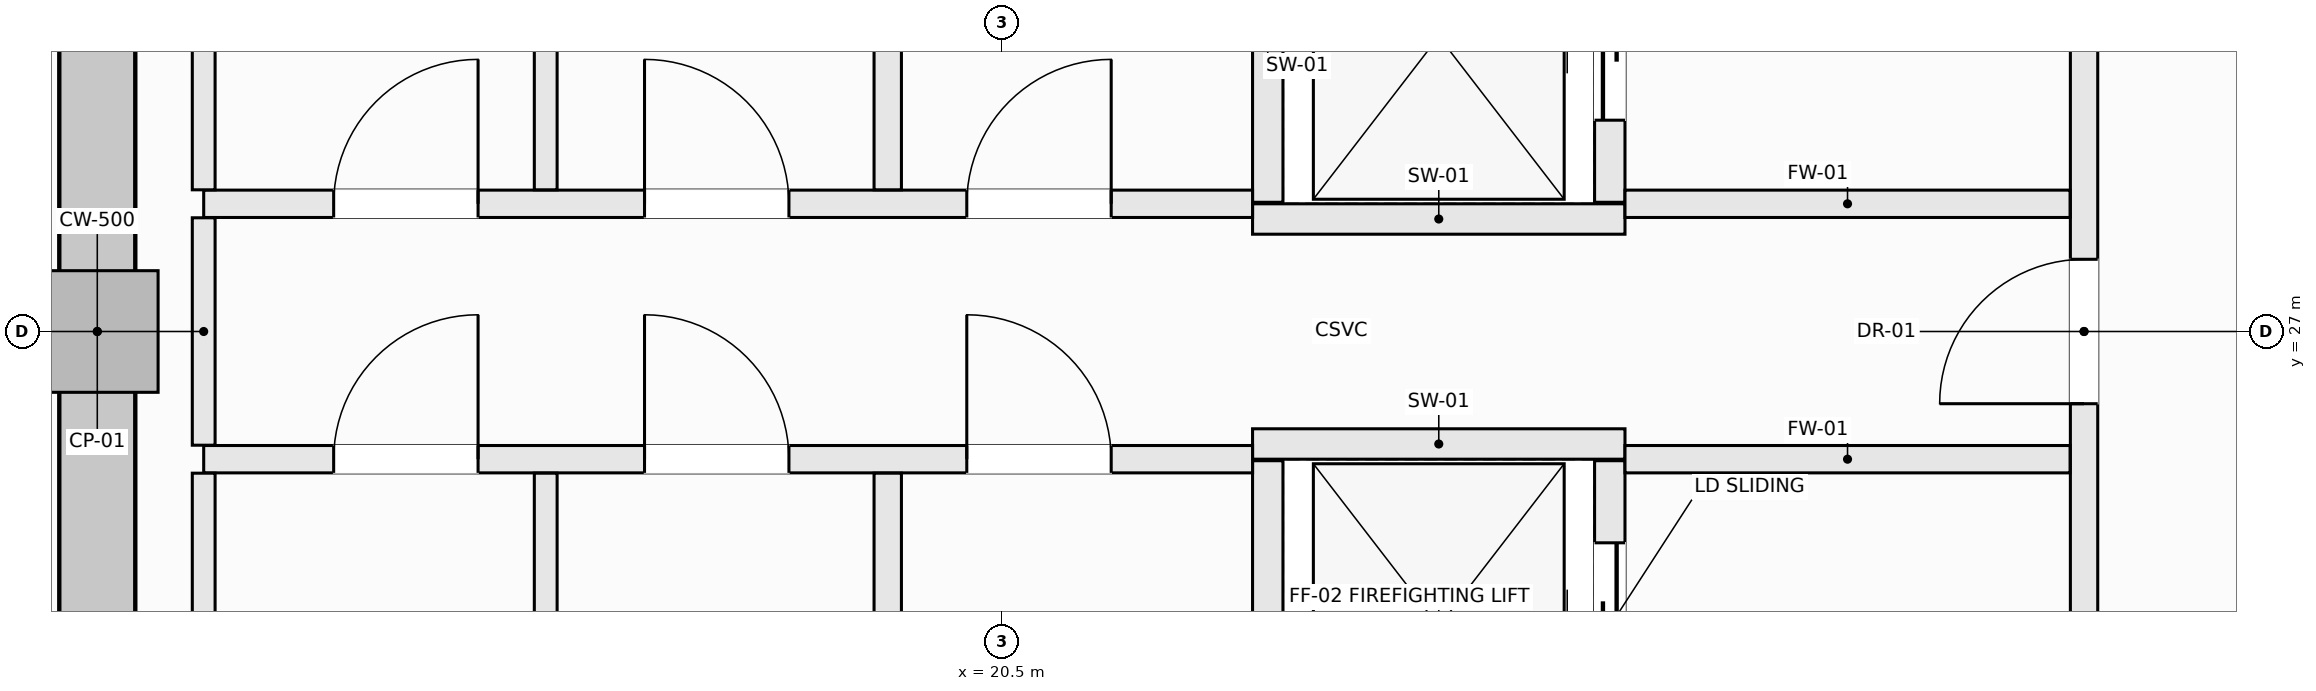
"""IFC4 building model, lengths in metres.
Left out: names, types, materials, properties, quantities, classifications, styles, units other than length and angle.
Written with IfcOpenShell. Run it as: python <this file> out.ifc"""

import sys

from ifc_helpers import new_model, si_unit, direction, frame, frame_2d, origin, origin_2d, place, context, subcontext, project, spatial, rectangle, extrude, element, fill, save


model = new_model("IFC4")
c1 = context("Model", 3, precision=1e-05, world=origin(), true_north=direction((0.0, 1.0)))
c2 = subcontext(c1, "Body", "Model", "MODEL_VIEW")
j1 = project(units=[si_unit("LENGTHUNIT", "METRE"), si_unit("PLANEANGLEUNIT", "RADIAN")], contexts=[c1])
p1 = place(None, origin())
s1 = spatial("IfcSite", under=j1, at=p1, CompositionType="ELEMENT")
p2 = place(p1, origin())
s2 = spatial("IfcBuilding", under=s1, at=p2, CompositionType="ELEMENT")
p3 = place(p2, frame((0.0, 0.0, 191.9)))
s3 = spatial("IfcBuildingStorey", under=s2, at=p3, CompositionType="ELEMENT", Elevation=191.9)
p4 = place(p3, frame((14.55, 20.55, -0.28), z_axis=(0.0, 0.0, 1.0), x_axis=(0.0, 1.0, 0.0)))
e1 = element("IfcWall", 1, at=p4, inside=s3, PredefinedType="SHEAR", context=c2, shape_type="SweptSolid", body=[
    extrude(rectangle(XDim=12.9, YDim=0.5, at=frame_2d((6.45, 0.0))), origin(), (0.0, 0.0, 1.0), 4.51),
])
p5 = place(p3, frame((14.55, 27.0, -0.28), z_axis=(0.0, 0.0, 1.0), x_axis=(1.0, 0.0, 0.0)))
e2 = element("IfcColumn", 2, at=p5, inside=s3, PredefinedType="PILASTER", context=c2, shape_type="SweptSolid", body=[
    extrude(rectangle(XDim=0.8, YDim=0.8, at=origin_2d()), origin(), (0.0, 0.0, 1.0), 4.51),
])
p6 = place(p3, frame((22.15, 27.74, 0.0), z_axis=(0.0, 0.0, 1.0), x_axis=(1.0, 0.0, 0.0)))
e3 = element("IfcWall", 3, at=p6, inside=s3, PredefinedType="SOLIDWALL", context=c2, shape_type="SweptSolid", body=[
    extrude(rectangle(XDim=2.45, YDim=0.2, at=frame_2d((1.225, 0.0))), origin(), (0.0, 0.0, 1.0), 4.23),
])
p7 = place(p3, frame((22.25, 27.85, 0.0), z_axis=(0.0, 0.0, 1.0), x_axis=(0.0, 1.0, 0.0)))
e4 = element("IfcWall", 4, at=p7, inside=s3, PredefinedType="SOLIDWALL", context=c2, shape_type="SweptSolid", body=[
    extrude(rectangle(XDim=2.18, YDim=0.2, at=frame_2d((1.09, 0.0))), origin(), (0.0, 0.0, 1.0), 4.23),
])
p8 = place(p3, frame((24.5, 27.85, 0.0), z_axis=(0.0, 0.0, 1.0), x_axis=(0.0, 1.0, 0.0)))
e5 = element("IfcWall", 5, at=p8, inside=s3, PredefinedType="SOLIDWALL", context=c2, shape_type="SweptSolid", body=[
    extrude(rectangle(XDim=2.18, YDim=0.2, at=frame_2d((1.09, 0.0))), origin(), (0.0, 0.0, 1.0), 4.23),
])
p9 = place(p8, frame((0.54, 0.0, 0.0)))
e6 = element("IfcOpeningElement", 6, at=p9, cuts=e5, PredefinedType="OPENING", context=c2, shape_type="SweptSolid", body=[
    extrude(rectangle(XDim=1.1, YDim=2.2, at=frame_2d((0.55, 1.1))), frame((0.0, 0.11, 0.0), z_axis=(0.0, -1.0, 0.0), x_axis=(1.0, 0.0, 0.0)), (0.0, 0.0, 1.0), 0.22),
])
p10 = place(p3, frame((22.15, 26.26, 0.0), z_axis=(0.0, 0.0, 1.0), x_axis=(1.0, 0.0, 0.0)))
e7 = element("IfcWall", 7, at=p10, inside=s3, PredefinedType="SOLIDWALL", context=c2, shape_type="SweptSolid", body=[
    extrude(rectangle(XDim=2.45, YDim=0.2, at=frame_2d((1.225, 0.0))), origin(), (0.0, 0.0, 1.0), 4.23),
])
p11 = place(p3, frame((22.25, 23.97, 0.0), z_axis=(0.0, 0.0, 1.0), x_axis=(0.0, 1.0, 0.0)))
e8 = element("IfcWall", 8, at=p11, inside=s3, PredefinedType="SOLIDWALL", context=c2, shape_type="SweptSolid", body=[
    extrude(rectangle(XDim=2.18, YDim=0.2, at=frame_2d((1.09, 0.0))), origin(), (0.0, 0.0, 1.0), 4.23),
])
p12 = place(p3, frame((24.5, 23.97, 0.0), z_axis=(0.0, 0.0, 1.0), x_axis=(0.0, 1.0, 0.0)))
e9 = element("IfcWall", 9, at=p12, inside=s3, PredefinedType="SOLIDWALL", context=c2, shape_type="SweptSolid", body=[
    extrude(rectangle(XDim=2.18, YDim=0.2, at=frame_2d((1.09, 0.0))), origin(), (0.0, 0.0, 1.0), 4.23),
])
p13 = place(p12, frame((0.54, 0.0, 0.0)))
e10 = element("IfcOpeningElement", 10, at=p13, cuts=e9, PredefinedType="OPENING", context=c2, shape_type="SweptSolid", body=[
    extrude(rectangle(XDim=1.1, YDim=2.2, at=frame_2d((0.55, 1.1))), frame((0.0, 0.11, 0.0), z_axis=(0.0, -1.0, 0.0), x_axis=(1.0, 0.0, 0.0)), (0.0, 0.0, 1.0), 0.22),
])
p14 = place(p3, frame((27.62, 22.05, 0.0), z_axis=(0.0, 0.0, 1.0), x_axis=(0.0, 1.0, 0.0)))
e11 = element("IfcWall", 11, at=p14, inside=s3, PredefinedType="SOLIDWALL", context=c2, shape_type="SweptSolid", body=[
    extrude(rectangle(XDim=9.9, YDim=0.18, at=frame_2d((4.95, 0.0))), origin(), (0.0, 0.0, 1.0), 3.322),
])
p15 = place(p14, frame((4.475, 0.0, 0.0)))
e12 = element("IfcOpeningElement", 12, at=p15, cuts=e11, PredefinedType="OPENING", context=c2, shape_type="SweptSolid", body=[
    extrude(rectangle(XDim=0.95, YDim=2.1, at=frame_2d((0.475, 1.05))), frame((0.0, 0.1, 0.0), z_axis=(0.0, -1.0, 0.0), x_axis=(1.0, 0.0, 0.0)), (0.0, 0.0, 1.0), 0.2),
])
p16 = place(p14, frame((6.89, 0.0, 0.0)))
e13 = element("IfcOpeningElement", 13, at=p16, cuts=e11, PredefinedType="OPENING", context=c2, shape_type="SweptSolid", body=[
    extrude(rectangle(XDim=1.5, YDim=2.2, at=frame_2d((0.75, 1.1))), frame((0.0, 0.1, 0.0), z_axis=(0.0, -1.0, 0.0), x_axis=(1.0, 0.0, 0.0)), (0.0, 0.0, 1.0), 0.2),
])
p17 = place(p14, frame((1.51, 0.0, 0.0)))
e14 = element("IfcOpeningElement", 14, at=p17, cuts=e11, PredefinedType="OPENING", context=c2, shape_type="SweptSolid", body=[
    extrude(rectangle(XDim=1.5, YDim=2.2, at=frame_2d((0.75, 1.1))), frame((0.0, 0.1, 0.0), z_axis=(0.0, -1.0, 0.0), x_axis=(1.0, 0.0, 0.0)), (0.0, 0.0, 1.0), 0.2),
])
p18 = place(p3, frame((15.25, 27.84, 0.0), z_axis=(0.0, 0.0, 1.0), x_axis=(1.0, 0.0, 0.0)))
e15 = element("IfcWall", 15, at=p18, inside=s3, PredefinedType="SOLIDWALL", context=c2, shape_type="SweptSolid", body=[
    extrude(rectangle(XDim=6.9, YDim=0.18, at=frame_2d((3.45, 0.0))), origin(), (0.0, 0.0, 1.0), 4.23),
])
p19 = place(p18, frame((5.02, 0.0, 0.0)))
e16 = element("IfcOpeningElement", 16, at=p19, cuts=e15, PredefinedType="OPENING", context=c2, shape_type="SweptSolid", body=[
    extrude(rectangle(XDim=0.95, YDim=2.1, at=frame_2d((0.475, 1.05))), frame((0.0, 0.1, 0.0), z_axis=(0.0, -1.0, 0.0), x_axis=(1.0, 0.0, 0.0)), (0.0, 0.0, 1.0), 0.2),
])
p20 = place(p18, frame((0.855, 0.0, 0.0)))
e17 = element("IfcOpeningElement", 17, at=p20, cuts=e15, PredefinedType="OPENING", context=c2, shape_type="SweptSolid", body=[
    extrude(rectangle(XDim=0.95, YDim=2.1, at=frame_2d((0.475, 1.05))), frame((0.0, 0.1, 0.0), z_axis=(0.0, -1.0, 0.0), x_axis=(1.0, 0.0, 0.0)), (0.0, 0.0, 1.0), 0.2),
])
p21 = place(p18, frame((2.9, 0.0, 0.0)))
e18 = element("IfcOpeningElement", 18, at=p21, cuts=e15, PredefinedType="OPENING", context=c2, shape_type="SweptSolid", body=[
    extrude(rectangle(XDim=0.95, YDim=2.1, at=frame_2d((0.475, 1.05))), frame((0.0, 0.1, 0.0), z_axis=(0.0, -1.0, 0.0), x_axis=(1.0, 0.0, 0.0)), (0.0, 0.0, 1.0), 0.2),
])
p22 = place(p3, frame((24.6, 27.84, 0.0), z_axis=(0.0, 0.0, 1.0), x_axis=(1.0, 0.0, 0.0)))
e19 = element("IfcWall", 19, at=p22, inside=s3, PredefinedType="SOLIDWALL", context=c2, shape_type="SweptSolid", body=[
    extrude(rectangle(XDim=2.928, YDim=0.18, at=frame_2d((1.464, 0.0))), origin(), (0.0, 0.0, 1.0), 4.23),
])
p23 = place(p3, frame((15.25, 26.16, 0.0), z_axis=(0.0, 0.0, 1.0), x_axis=(1.0, 0.0, 0.0)))
e20 = element("IfcWall", 20, at=p23, inside=s3, PredefinedType="SOLIDWALL", context=c2, shape_type="SweptSolid", body=[
    extrude(rectangle(XDim=6.9, YDim=0.18, at=frame_2d((3.45, 0.0))), origin(), (0.0, 0.0, 1.0), 4.23),
])
p24 = place(p23, frame((5.02, 0.0, 0.0)))
e21 = element("IfcOpeningElement", 21, at=p24, cuts=e20, PredefinedType="OPENING", context=c2, shape_type="SweptSolid", body=[
    extrude(rectangle(XDim=0.95, YDim=2.1, at=frame_2d((0.475, 1.05))), frame((0.0, 0.1, 0.0), z_axis=(0.0, -1.0, 0.0), x_axis=(1.0, 0.0, 0.0)), (0.0, 0.0, 1.0), 0.2),
])
p25 = place(p23, frame((0.855, 0.0, 0.0)))
e22 = element("IfcOpeningElement", 22, at=p25, cuts=e20, PredefinedType="OPENING", context=c2, shape_type="SweptSolid", body=[
    extrude(rectangle(XDim=0.95, YDim=2.1, at=frame_2d((0.475, 1.05))), frame((0.0, 0.1, 0.0), z_axis=(0.0, -1.0, 0.0), x_axis=(1.0, 0.0, 0.0)), (0.0, 0.0, 1.0), 0.2),
])
p26 = place(p23, frame((2.9, 0.0, 0.0)))
e23 = element("IfcOpeningElement", 23, at=p26, cuts=e20, PredefinedType="OPENING", context=c2, shape_type="SweptSolid", body=[
    extrude(rectangle(XDim=0.95, YDim=2.1, at=frame_2d((0.475, 1.05))), frame((0.0, 0.1, 0.0), z_axis=(0.0, -1.0, 0.0), x_axis=(1.0, 0.0, 0.0)), (0.0, 0.0, 1.0), 0.2),
])
p27 = place(p3, frame((24.6, 26.16, 0.0), z_axis=(0.0, 0.0, 1.0), x_axis=(1.0, 0.0, 0.0)))
e24 = element("IfcWall", 24, at=p27, inside=s3, PredefinedType="SOLIDWALL", context=c2, shape_type="SweptSolid", body=[
    extrude(rectangle(XDim=2.928, YDim=0.18, at=frame_2d((1.464, 0.0))), origin(), (0.0, 0.0, 1.0), 4.23),
])
p28 = place(p3, frame((15.25, 23.962, 0.0), z_axis=(0.0, 0.0, 1.0), x_axis=(0.0, 1.0, 0.0)))
e25 = element("IfcWall", 25, at=p28, inside=s3, PredefinedType="PARTITIONING", context=c2, shape_type="SweptSolid", body=[
    extrude(rectangle(XDim=2.106, YDim=0.15, at=frame_2d((1.053, 0.0))), origin(), (0.0, 0.0, 1.0), 4.23),
])
p29 = place(p3, frame((15.25, 26.252, 0.0), z_axis=(0.0, 0.0, 1.0), x_axis=(0.0, 1.0, 0.0)))
e26 = element("IfcWall", 26, at=p29, inside=s3, PredefinedType="PARTITIONING", context=c2, shape_type="SweptSolid", body=[
    extrude(rectangle(XDim=1.496, YDim=0.15, at=frame_2d((0.748, 0.0))), origin(), (0.0, 0.0, 1.0), 4.23),
])
p30 = place(p3, frame((15.25, 27.932, 0.0), z_axis=(0.0, 0.0, 1.0), x_axis=(0.0, 1.0, 0.0)))
e27 = element("IfcWall", 27, at=p30, inside=s3, PredefinedType="PARTITIONING", context=c2, shape_type="SweptSolid", body=[
    extrude(rectangle(XDim=2.106, YDim=0.15, at=frame_2d((1.053, 0.0))), origin(), (0.0, 0.0, 1.0), 4.23),
])
for number, where, z_axis, x_axis in (
    (28, (19.75, 23.962, 0.0), (0.0, 0.0, 1.0), (0.0, 1.0, 0.0)),
    (29, (19.75, 27.932, 0.0), (0.0, 0.0, 1.0), (0.0, 1.0, 0.0)),
):
    element("IfcWall", number, at=place(p3, frame(where, z_axis=z_axis, x_axis=x_axis)), inside=s3, PredefinedType="SOLIDWALL", context=c2, shape_type="SweptSolid", body=[
        extrude(rectangle(XDim=2.106, YDim=0.18, at=frame_2d((1.053, 0.0))), origin(), (0.0, 0.0, 1.0), 4.23),
    ])
for number, where, z_axis, x_axis in (
    (30, (17.5, 23.962, 0.0), (0.0, 0.0, 1.0), (0.0, 1.0, 0.0)),
    (31, (17.5, 27.932, 0.0), (0.0, 0.0, 1.0), (0.0, 1.0, 0.0)),
):
    element("IfcWall", number, at=place(p3, frame(where, z_axis=z_axis, x_axis=x_axis)), inside=s3, PredefinedType="PARTITIONING", context=c2, shape_type="SweptSolid", body=[
        extrude(rectangle(XDim=2.106, YDim=0.15, at=frame_2d((1.053, 0.0))), origin(), (0.0, 0.0, 1.0), 4.23),
    ])
p31 = place(p9, origin())
e32 = element("IfcDoor", 32, at=p31, inside=s3, OperationType="SLIDING_TO_LEFT", PredefinedType="DOOR", context=c2, shape_type="SweptSolid", body=[
    extrude(rectangle(XDim=1.1, YDim=2.2, at=frame_2d((0.55, 1.1))), frame((0.0, 0.025, 0.0), z_axis=(0.0, -1.0, 0.0), x_axis=(1.0, 0.0, 0.0)), (0.0, 0.0, 1.0), 0.05),
])
fill(e6, e32)
p32 = place(p13, origin())
e33 = element("IfcDoor", 33, at=p32, inside=s3, OperationType="SLIDING_TO_LEFT", PredefinedType="DOOR", context=c2, shape_type="SweptSolid", body=[
    extrude(rectangle(XDim=1.1, YDim=2.2, at=frame_2d((0.55, 1.1))), frame((0.0, 0.025, 0.0), z_axis=(0.0, -1.0, 0.0), x_axis=(1.0, 0.0, 0.0)), (0.0, 0.0, 1.0), 0.05),
])
fill(e10, e33)
p33 = place(p15, origin())
e34 = element("IfcDoor", 34, at=p33, inside=s3, OperationType="SINGLE_SWING_LEFT", PredefinedType="DOOR", context=c2, shape_type="SweptSolid", body=[
    extrude(rectangle(XDim=0.95, YDim=2.1, at=frame_2d((0.475, 1.05))), frame((0.0, 0.025, 0.0), z_axis=(0.0, -1.0, 0.0), x_axis=(1.0, 0.0, 0.0)), (0.0, 0.0, 1.0), 0.05),
])
fill(e12, e34)
p34 = place(p19, origin())
e35 = element("IfcDoor", 35, at=p34, inside=s3, OperationType="SINGLE_SWING_RIGHT", PredefinedType="DOOR", context=c2, shape_type="SweptSolid", body=[
    extrude(rectangle(XDim=0.95, YDim=2.1, at=frame_2d((0.475, 1.05))), frame((0.0, 0.025, 0.0), z_axis=(0.0, -1.0, 0.0), x_axis=(1.0, 0.0, 0.0)), (0.0, 0.0, 1.0), 0.05),
])
fill(e16, e35)
p35 = place(p24, origin())
e36 = element("IfcDoor", 36, at=p35, inside=s3, OperationType="SINGLE_SWING_LEFT", PredefinedType="DOOR", context=c2, shape_type="SweptSolid", body=[
    extrude(rectangle(XDim=0.95, YDim=2.1, at=frame_2d((0.475, 1.05))), frame((0.0, 0.025, 0.0), z_axis=(0.0, -1.0, 0.0), x_axis=(1.0, 0.0, 0.0)), (0.0, 0.0, 1.0), 0.05),
])
fill(e21, e36)
p36 = place(p20, origin())
e37 = element("IfcDoor", 37, at=p36, inside=s3, OperationType="SINGLE_SWING_RIGHT", PredefinedType="DOOR", context=c2, shape_type="SweptSolid", body=[
    extrude(rectangle(XDim=0.95, YDim=2.1, at=frame_2d((0.475, 1.05))), frame((0.0, 0.025, 0.0), z_axis=(0.0, -1.0, 0.0), x_axis=(1.0, 0.0, 0.0)), (0.0, 0.0, 1.0), 0.05),
])
fill(e17, e37)
p37 = place(p21, origin())
e38 = element("IfcDoor", 38, at=p37, inside=s3, OperationType="SINGLE_SWING_LEFT", PredefinedType="DOOR", context=c2, shape_type="SweptSolid", body=[
    extrude(rectangle(XDim=0.95, YDim=2.1, at=frame_2d((0.475, 1.05))), frame((0.0, 0.025, 0.0), z_axis=(0.0, -1.0, 0.0), x_axis=(1.0, 0.0, 0.0)), (0.0, 0.0, 1.0), 0.05),
])
fill(e18, e38)
p38 = place(p25, origin())
e39 = element("IfcDoor", 39, at=p38, inside=s3, OperationType="SINGLE_SWING_RIGHT", PredefinedType="DOOR", context=c2, shape_type="SweptSolid", body=[
    extrude(rectangle(XDim=0.95, YDim=2.1, at=frame_2d((0.475, 1.05))), frame((0.0, 0.025, 0.0), z_axis=(0.0, -1.0, 0.0), x_axis=(1.0, 0.0, 0.0)), (0.0, 0.0, 1.0), 0.05),
])
fill(e22, e39)
p39 = place(p26, origin())
e40 = element("IfcDoor", 40, at=p39, inside=s3, OperationType="SINGLE_SWING_LEFT", PredefinedType="DOOR", context=c2, shape_type="SweptSolid", body=[
    extrude(rectangle(XDim=0.95, YDim=2.1, at=frame_2d((0.475, 1.05))), frame((0.0, 0.025, 0.0), z_axis=(0.0, -1.0, 0.0), x_axis=(1.0, 0.0, 0.0)), (0.0, 0.0, 1.0), 0.05),
])
fill(e23, e40)
save(model, sys.argv[1])
